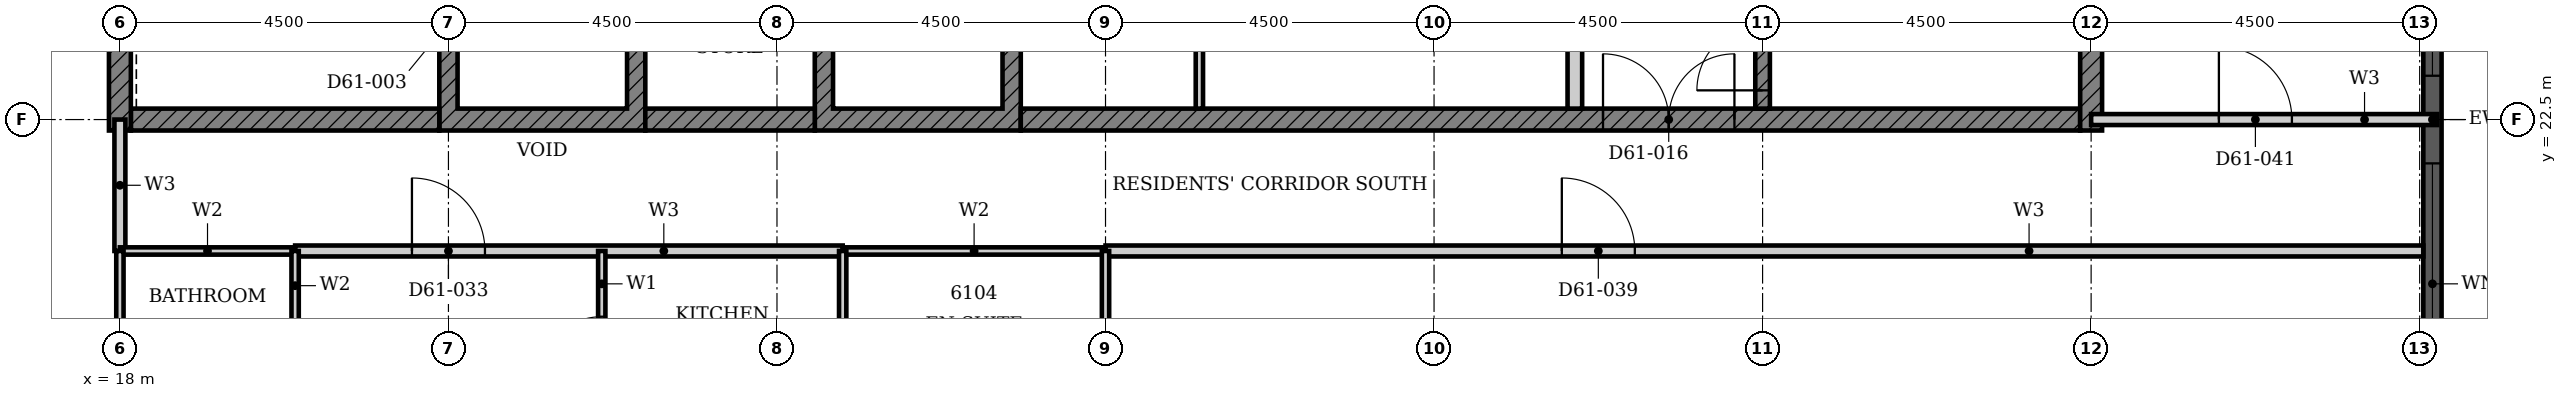
"""IFC4 building model, lengths in metres.
Left out: names, types, materials, properties, quantities, classifications, styles, units other than length and angle.
Written with IfcOpenShell. Run it as: python <this file> out.ifc"""

import sys

from ifc_helpers import new_model, si_unit, direction, frame, frame_2d, origin, place, context, subcontext, project, spatial, polyline, rectangle, outline, extrude, element, fill, save


model = new_model("IFC4")
c1 = context("Model", 3, precision=1e-05, world=origin(), true_north=direction((0.0, 1.0)))
c2 = subcontext(c1, "Body", "Model", "MODEL_VIEW")
j1 = project(units=[si_unit("LENGTHUNIT", "METRE"), si_unit("PLANEANGLEUNIT", "RADIAN")], contexts=[c1])
p1 = place(None, origin())
s1 = spatial("IfcSite", under=j1, at=p1, CompositionType="ELEMENT")
p2 = place(p1, origin())
s2 = spatial("IfcBuilding", under=s1, at=p2, CompositionType="ELEMENT")
p3 = place(p2, frame((0.0, 0.0, 241.6)))
s3 = spatial("IfcBuildingStorey", under=s2, at=p3, CompositionType="ELEMENT", Elevation=241.6)
p4 = place(p3, frame((49.675, 18.3, 0.0), z_axis=(0.0, 0.0, 1.0), x_axis=(0.0, 1.0, 0.0)))
e1 = element("IfcWall", 1, at=p4, inside=s3, PredefinedType="SOLIDWALL", context=c2, shape_type="SweptSolid", body=[
    extrude(rectangle(XDim=8.4, YDim=0.25, at=frame_2d((4.2, 0.0))), origin(), (0.0, 0.0, 1.0), 3.7),
])
p5 = place(p4, frame((0.3, 0.0, 0.45)))
e2 = element("IfcOpeningElement", 2, at=p5, cuts=e1, PredefinedType="OPENING", context=c2, shape_type="SweptSolid", body=[
    extrude(rectangle(XDim=3.3, YDim=2.3, at=frame_2d((1.65, 1.15))), frame((0.0, 0.135, 0.0), z_axis=(0.0, -1.0, 0.0), x_axis=(1.0, 0.0, 0.0)), (0.0, 0.0, 1.0), 0.27),
])
p6 = place(p4, frame((4.8, 0.0, 0.45)))
e3 = element("IfcOpeningElement", 3, at=p6, cuts=e1, PredefinedType="OPENING", context=c2, shape_type="SweptSolid", body=[
    extrude(rectangle(XDim=3.3, YDim=2.3, at=frame_2d((1.65, 1.15))), frame((0.0, 0.135, 0.0), z_axis=(0.0, -1.0, 0.0), x_axis=(1.0, 0.0, 0.0)), (0.0, 0.0, 1.0), 0.27),
])
p7 = place(p3, origin())
e4 = element("IfcWall", 4, at=p7, inside=s3, PredefinedType="SHEAR", context=c2, shape_type="SweptSolid", body=[
    extrude(outline(polyline([(22.375, 22.35), (25.197, 22.35), (25.197, 25.275), (24.947, 25.275), (24.947, 22.65), (22.625, 22.65), (22.625, 25.275), (22.375, 25.275), (22.375, 22.35)])), origin(), (0.0, 0.0, 1.0), 3.4),
])
p8 = place(p3, origin())
e5 = element("IfcWall", 5, at=p8, inside=s3, PredefinedType="SHEAR", context=c2, shape_type="SweptSolid", body=[
    extrude(outline(polyline([(27.518, 22.35), (30.339, 22.35), (30.339, 25.275), (30.089, 25.275), (30.089, 22.65), (27.768, 22.65), (27.768, 25.275), (27.518, 25.275), (27.518, 22.35)])), origin(), (0.0, 0.0, 1.0), 3.4),
])
p9 = place(p3, frame((18.15, 22.5, 0.0), z_axis=(0.0, 0.0, 1.0), x_axis=(1.0, 0.0, 0.0)))
e6 = element("IfcWall", 6, at=p9, inside=s3, PredefinedType="SHEAR", context=c2, shape_type="SweptSolid", body=[
    extrude(rectangle(XDim=4.225, YDim=0.3, at=frame_2d((2.113, 0.0))), origin(), (0.0, 0.0, 1.0), 3.4),
])
p10 = place(p3, frame((25.197, 22.5, 0.0), z_axis=(0.0, 0.0, 1.0), x_axis=(1.0, 0.0, 0.0)))
e7 = element("IfcWall", 7, at=p10, inside=s3, PredefinedType="SHEAR", context=c2, shape_type="SweptSolid", body=[
    extrude(rectangle(XDim=2.321, YDim=0.3, at=frame_2d((1.161, 0.0))), origin(), (0.0, 0.0, 1.0), 3.4),
])
p11 = place(p3, frame((30.339, 22.5, 0.0), z_axis=(0.0, 0.0, 1.0), x_axis=(1.0, 0.0, 0.0)))
e8 = element("IfcWall", 8, at=p11, inside=s3, PredefinedType="SHEAR", context=c2, shape_type="SweptSolid", body=[
    extrude(rectangle(XDim=14.511, YDim=0.3, at=frame_2d((7.255, 0.0))), origin(), (0.0, 0.0, 1.0), 3.4),
])
p12 = place(p11, frame((7.975, 0.0, 0.0)))
e9 = element("IfcOpeningElement", 9, at=p12, cuts=e8, PredefinedType="OPENING", context=c2, shape_type="SweptSolid", body=[
    extrude(rectangle(XDim=1.8, YDim=2.1, at=frame_2d((0.9, 1.05))), frame((0.0, 0.16, 0.0), z_axis=(0.0, -1.0, 0.0), x_axis=(1.0, 0.0, 0.0)), (0.0, 0.0, 1.0), 0.32),
])
for number, where, z_axis, x_axis in (
    (10, (18.0, 22.35, 0.0), (0.0, 0.0, 1.0), (0.0, 1.0, 0.0)),
    (11, (45.0, 22.35, 0.0), (0.0, 0.0, 1.0), (0.0, 1.0, 0.0)),
):
    element("IfcWall", number, at=place(p3, frame(where, z_axis=z_axis, x_axis=x_axis)), inside=s3, PredefinedType="SHEAR", context=c2, shape_type="SweptSolid", body=[
        extrude(rectangle(XDim=9.3, YDim=0.3, at=frame_2d((4.65, 0.0))), origin(), (0.0, 0.0, 1.0), 3.4),
    ])
p13 = place(p3, frame((37.928, 22.65, 0.0), z_axis=(0.0, 0.0, 1.0), x_axis=(0.0, 1.0, 0.0)))
e12 = element("IfcWall", 12, at=p13, inside=s3, PredefinedType="PARTITIONING", context=c2, shape_type="SweptSolid", body=[
    extrude(rectangle(XDim=2.625, YDim=0.2, at=frame_2d((1.312, 0.0))), origin(), (0.0, 0.0, 1.0), 3.4),
])
p14 = place(p3, frame((32.786, 22.65, 0.0), z_axis=(0.0, 0.0, 1.0), x_axis=(0.0, 1.0, 0.0)))
e13 = element("IfcWall", 13, at=p14, inside=s3, PredefinedType="PARTITIONING", context=c2, shape_type="SweptSolid", body=[
    extrude(rectangle(XDim=2.625, YDim=0.1, at=frame_2d((1.312, 0.0))), origin(), (0.0, 0.0, 1.0), 3.4),
])
p15 = place(p3, frame((40.5, 22.65, 0.0), z_axis=(0.0, 0.0, 1.0), x_axis=(0.0, 1.0, 0.0)))
e14 = element("IfcWall", 14, at=p15, inside=s3, PredefinedType="SHEAR", context=c2, shape_type="SweptSolid", body=[
    extrude(rectangle(XDim=5.825, YDim=0.2, at=frame_2d((2.913, 0.0))), origin(), (0.0, 0.0, 1.0), 3.4),
])
p16 = place(p15, frame((0.25, 0.0, 0.0)))
e15 = element("IfcOpeningElement", 15, at=p16, cuts=e14, PredefinedType="OPENING", context=c2, shape_type="SweptSolid", body=[
    extrude(rectangle(XDim=1.8, YDim=2.1, at=frame_2d((0.9, 1.05))), frame((0.0, 0.11, 0.0), z_axis=(0.0, -1.0, 0.0), x_axis=(1.0, 0.0, 0.0)), (0.0, 0.0, 1.0), 0.22),
])
p17 = place(p3, frame((20.4, 20.7, 0.0), z_axis=(0.0, 0.0, 1.0), x_axis=(1.0, 0.0, 0.0)))
e16 = element("IfcWall", 16, at=p17, inside=s3, PredefinedType="PARTITIONING", context=c2, shape_type="SweptSolid", body=[
    extrude(rectangle(XDim=7.5, YDim=0.15, at=frame_2d((3.75, 0.0))), origin(), (0.0, 0.0, 1.0), 3.4),
])
p18 = place(p17, frame((1.6, 0.0, 0.0)))
e17 = element("IfcOpeningElement", 17, at=p18, cuts=e16, PredefinedType="OPENING", context=c2, shape_type="SweptSolid", body=[
    extrude(rectangle(XDim=1.0, YDim=2.2, at=frame_2d((0.5, 1.1))), frame((0.0, 0.085, 0.0), z_axis=(0.0, -1.0, 0.0), x_axis=(1.0, 0.0, 0.0)), (0.0, 0.0, 1.0), 0.17),
])
p19 = place(p3, frame((31.5, 20.7, 0.0), z_axis=(0.0, 0.0, 1.0), x_axis=(1.0, 0.0, 0.0)))
e18 = element("IfcWall", 18, at=p19, inside=s3, PredefinedType="PARTITIONING", context=c2, shape_type="SweptSolid", body=[
    extrude(rectangle(XDim=18.05, YDim=0.15, at=frame_2d((9.025, 0.0))), origin(), (0.0, 0.0, 1.0), 3.4),
])
p20 = place(p19, frame((6.25, 0.0, 0.0)))
e19 = element("IfcOpeningElement", 19, at=p20, cuts=e18, PredefinedType="OPENING", context=c2, shape_type="SweptSolid", body=[
    extrude(rectangle(XDim=1.0, YDim=2.1, at=frame_2d((0.5, 1.05))), frame((0.0, 0.085, 0.0), z_axis=(0.0, -1.0, 0.0), x_axis=(1.0, 0.0, 0.0)), (0.0, 0.0, 1.0), 0.17),
])
p21 = place(p3, frame((45.0, 22.5, 0.0), z_axis=(0.0, 0.0, 1.0), x_axis=(1.0, 0.0, 0.0)))
e20 = element("IfcWall", 20, at=p21, inside=s3, PredefinedType="PARTITIONING", context=c2, shape_type="SweptSolid", body=[
    extrude(rectangle(XDim=4.74, YDim=0.15, at=frame_2d((2.37, 0.0))), origin(), (0.0, 0.0, 1.0), 3.4),
])
p22 = place(p21, frame((1.75, 0.0, 0.0)))
e21 = element("IfcOpeningElement", 21, at=p22, cuts=e20, PredefinedType="OPENING", context=c2, shape_type="SweptSolid", body=[
    extrude(rectangle(XDim=1.0, YDim=2.2, at=frame_2d((0.5, 1.1))), frame((0.0, 0.085, 0.0), z_axis=(0.0, -1.0, 0.0), x_axis=(1.0, 0.0, 0.0)), (0.0, 0.0, 1.0), 0.17),
])
p23 = place(p3, frame((18.0, 20.7, 0.0), z_axis=(0.0, 0.0, 1.0), x_axis=(0.0, 1.0, 0.0)))
e22 = element("IfcWall", 22, at=p23, inside=s3, PredefinedType="PARTITIONING", context=c2, shape_type="SweptSolid", body=[
    extrude(rectangle(XDim=1.8, YDim=0.15, at=frame_2d((0.9, 0.0))), origin(), (0.0, 0.0, 1.0), 3.4),
])
p24 = place(p3, frame((24.6, 18.0, 0.0), z_axis=(0.0, 0.0, 1.0), x_axis=(0.0, 1.0, 0.0)))
e23 = element("IfcWall", 23, at=p24, inside=s3, PredefinedType="PARTITIONING", context=c2, shape_type="SweptSolid", body=[
    extrude(rectangle(XDim=2.7, YDim=0.1, at=frame_2d((1.35, 0.0))), origin(), (0.0, 0.0, 1.0), 3.4),
])
p25 = place(p24, frame((0.9, 0.0, 0.0)))
e24 = element("IfcOpeningElement", 24, at=p25, cuts=e23, PredefinedType="OPENING", context=c2, shape_type="SweptSolid", body=[
    extrude(rectangle(XDim=0.9, YDim=2.1, at=frame_2d((0.45, 1.05))), frame((0.0, 0.06, 0.0), z_axis=(0.0, -1.0, 0.0), x_axis=(1.0, 0.0, 0.0)), (0.0, 0.0, 1.0), 0.12),
])
p26 = place(p3, frame((18.0, 20.7, 0.0), z_axis=(0.0, 0.0, 1.0), x_axis=(1.0, 0.0, 0.0)))
e25 = element("IfcWall", 25, at=p26, inside=s3, PredefinedType="PARTITIONING", context=c2, shape_type="SweptSolid", body=[
    extrude(rectangle(XDim=2.4, YDim=0.1, at=frame_2d((1.2, 0.0))), origin(), (0.0, 0.0, 1.0), 3.4),
])
p27 = place(p3, frame((27.9, 20.7, 0.0), z_axis=(0.0, 0.0, 1.0), x_axis=(1.0, 0.0, 0.0)))
e26 = element("IfcWall", 26, at=p27, inside=s3, PredefinedType="PARTITIONING", context=c2, shape_type="SweptSolid", body=[
    extrude(rectangle(XDim=3.6, YDim=0.1, at=frame_2d((1.8, 0.0))), origin(), (0.0, 0.0, 1.0), 3.4),
])
p28 = place(p3, frame((18.0, 18.0, 0.0), z_axis=(0.0, 0.0, 1.0), x_axis=(0.0, 1.0, 0.0)))
e27 = element("IfcWall", 27, at=p28, inside=s3, PredefinedType="PARTITIONING", context=c2, shape_type="SweptSolid", body=[
    extrude(rectangle(XDim=2.7, YDim=0.1, at=frame_2d((1.35, 0.0))), origin(), (0.0, 0.0, 1.0), 3.4),
])
p29 = place(p3, frame((20.4, 18.0, 0.0), z_axis=(0.0, 0.0, 1.0), x_axis=(0.0, 1.0, 0.0)))
e28 = element("IfcWall", 28, at=p29, inside=s3, PredefinedType="PARTITIONING", context=c2, shape_type="SweptSolid", body=[
    extrude(rectangle(XDim=2.7, YDim=0.1, at=frame_2d((1.35, 0.0))), origin(), (0.0, 0.0, 1.0), 3.4),
])
p30 = place(p29, frame((0.95, 0.0, 0.0)))
e29 = element("IfcOpeningElement", 29, at=p30, cuts=e28, PredefinedType="OPENING", context=c2, shape_type="SweptSolid", body=[
    extrude(rectangle(XDim=0.8, YDim=2.1, at=frame_2d((0.4, 1.05))), frame((0.0, 0.06, 0.0), z_axis=(0.0, -1.0, 0.0), x_axis=(1.0, 0.0, 0.0)), (0.0, 0.0, 1.0), 0.12),
])
for number, where, z_axis, x_axis in (
    (30, (27.9, 18.0, 0.0), (0.0, 0.0, 1.0), (0.0, 1.0, 0.0)),
    (31, (31.5, 18.0, 0.0), (0.0, 0.0, 1.0), (0.0, 1.0, 0.0)),
):
    element("IfcWall", number, at=place(p3, frame(where, z_axis=z_axis, x_axis=x_axis)), inside=s3, PredefinedType="PARTITIONING", context=c2, shape_type="SweptSolid", body=[
        extrude(rectangle(XDim=2.7, YDim=0.1, at=frame_2d((1.35, 0.0))), origin(), (0.0, 0.0, 1.0), 3.4),
    ])
p31 = place(p5, origin())
e32 = element("IfcWindow", 32, at=p31, inside=s3, PartitioningType="SINGLE_PANEL", PredefinedType="WINDOW", context=c2, shape_type="SweptSolid", body=[
    extrude(rectangle(XDim=3.3, YDim=2.3, at=frame_2d((1.65, 1.15))), frame((0.0, 0.03, 0.0), z_axis=(0.0, -1.0, 0.0), x_axis=(1.0, 0.0, 0.0)), (0.0, 0.0, 1.0), 0.06),
])
fill(e2, e32)
p32 = place(p6, origin())
e33 = element("IfcWindow", 33, at=p32, inside=s3, PartitioningType="SINGLE_PANEL", PredefinedType="WINDOW", context=c2, shape_type="SweptSolid", body=[
    extrude(rectangle(XDim=3.3, YDim=2.3, at=frame_2d((1.65, 1.15))), frame((0.0, 0.03, 0.0), z_axis=(0.0, -1.0, 0.0), x_axis=(1.0, 0.0, 0.0)), (0.0, 0.0, 1.0), 0.06),
])
fill(e3, e33)
p33 = place(p16, origin())
e34 = element("IfcDoor", 34, at=p33, inside=s3, OperationType="DOUBLE_DOOR_SINGLE_SWING", PredefinedType="DOOR", context=c2, shape_type="SweptSolid", body=[
    extrude(rectangle(XDim=1.8, YDim=2.1, at=frame_2d((0.9, 1.05))), frame((0.0, 0.025, 0.0), z_axis=(0.0, -1.0, 0.0), x_axis=(1.0, 0.0, 0.0)), (0.0, 0.0, 1.0), 0.05),
])
fill(e15, e34)
p34 = place(p12, origin())
e35 = element("IfcDoor", 35, at=p34, inside=s3, OperationType="DOUBLE_DOOR_SINGLE_SWING", PredefinedType="DOOR", context=c2, shape_type="SweptSolid", body=[
    extrude(rectangle(XDim=1.8, YDim=2.1, at=frame_2d((0.9, 1.05))), frame((0.0, 0.025, 0.0), z_axis=(0.0, -1.0, 0.0), x_axis=(1.0, 0.0, 0.0)), (0.0, 0.0, 1.0), 0.05),
])
fill(e9, e35)
p35 = place(p18, origin())
e36 = element("IfcDoor", 36, at=p35, inside=s3, OperationType="SINGLE_SWING_LEFT", PredefinedType="DOOR", context=c2, shape_type="SweptSolid", body=[
    extrude(rectangle(XDim=1.0, YDim=2.2, at=frame_2d((0.5, 1.1))), frame((0.0, 0.025, 0.0), z_axis=(0.0, -1.0, 0.0), x_axis=(1.0, 0.0, 0.0)), (0.0, 0.0, 1.0), 0.05),
])
fill(e17, e36)
p36 = place(p25, origin())
e37 = element("IfcDoor", 37, at=p36, inside=s3, OperationType="SINGLE_SWING_RIGHT", PredefinedType="DOOR", context=c2, shape_type="SweptSolid", body=[
    extrude(rectangle(XDim=0.9, YDim=2.1, at=frame_2d((0.45, 1.05))), frame((0.0, 0.025, 0.0), z_axis=(0.0, -1.0, 0.0), x_axis=(1.0, 0.0, 0.0)), (0.0, 0.0, 1.0), 0.05),
])
fill(e24, e37)
p37 = place(p20, origin())
e38 = element("IfcDoor", 38, at=p37, inside=s3, OperationType="SINGLE_SWING_RIGHT", PredefinedType="DOOR", context=c2, shape_type="SweptSolid", body=[
    extrude(rectangle(XDim=1.0, YDim=2.1, at=frame_2d((0.5, 1.05))), frame((0.0, 0.025, 0.0), z_axis=(0.0, -1.0, 0.0), x_axis=(1.0, 0.0, 0.0)), (0.0, 0.0, 1.0), 0.05),
])
fill(e19, e38)
p38 = place(p22, origin())
e39 = element("IfcDoor", 39, at=p38, inside=s3, OperationType="SINGLE_SWING_RIGHT", PredefinedType="DOOR", context=c2, shape_type="SweptSolid", body=[
    extrude(rectangle(XDim=1.0, YDim=2.2, at=frame_2d((0.5, 1.1))), frame((0.0, 0.025, 0.0), z_axis=(0.0, -1.0, 0.0), x_axis=(1.0, 0.0, 0.0)), (0.0, 0.0, 1.0), 0.05),
])
fill(e21, e39)
save(model, sys.argv[1])
